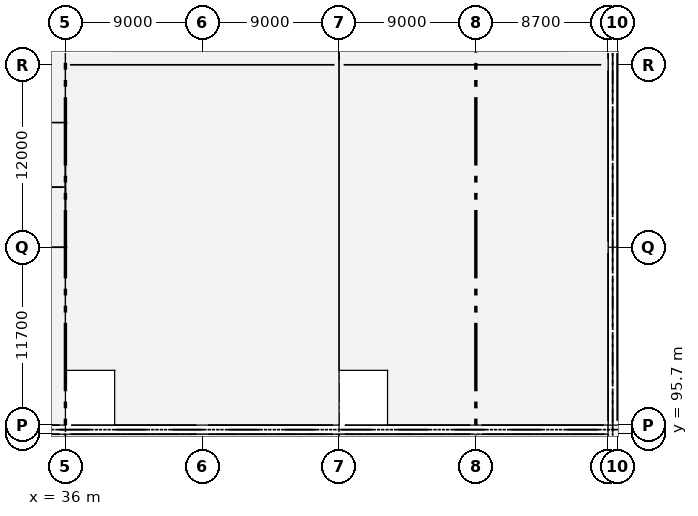
"""IFC4 building model, lengths in metres.
Left out: names, types, materials, properties, quantities, classifications, styles, units other than length and angle.
Written with IfcOpenShell. Run it as: python <this file> out.ifc"""

import sys

from ifc_helpers import new_model, si_unit, direction, frame, frame_2d, origin, origin_2d, place, context, subcontext, project, spatial, rectangle, extrude, element, fill, save


model = new_model("IFC4")
c1 = context("Model", 3, precision=1e-05, world=origin(), true_north=direction((0.0, 1.0)))
c2 = subcontext(c1, "Body", "Model", "MODEL_VIEW")
j1 = project(units=[si_unit("LENGTHUNIT", "METRE"), si_unit("PLANEANGLEUNIT", "RADIAN")], contexts=[c1])
p1 = place(None, origin())
s1 = spatial("IfcSite", under=j1, at=p1, CompositionType="ELEMENT")
p2 = place(p1, origin())
s2 = spatial("IfcBuilding", under=s1, at=p2, CompositionType="ELEMENT")
p3 = place(p2, origin())
s3 = spatial("IfcBuildingStorey", under=s2, at=p3, CompositionType="ELEMENT", Elevation=0.0)
for number, where, z_axis, x_axis in (
    (1, (36.0, 95.7, -0.5), (0.0, 0.0, 1.0), (1.0, 0.0, 0.0)),
    (2, (36.0, 96.3, -0.5), (0.0, 0.0, 1.0), (1.0, 0.0, 0.0)),
):
    element("IfcColumn", number, at=place(p3, frame(where, z_axis=z_axis, x_axis=x_axis)), inside=s3, PredefinedType="COLUMN", context=c2, shape_type="SweptSolid", body=[
        extrude(rectangle(XDim=0.75, YDim=0.55, at=origin_2d()), origin(), (0.0, 0.0, 1.0), 6.8),
    ])
for number, where, z_axis, x_axis in (
    (3, (36.0, 108.0, -0.5), (0.0, 0.0, 1.0), (1.0, 0.0, 0.0)),
    (4, (36.0, 120.0, -0.5), (0.0, 0.0, 1.0), (1.0, 0.0, 0.0)),
):
    element("IfcColumn", number, at=place(p3, frame(where, z_axis=z_axis, x_axis=x_axis)), inside=s3, PredefinedType="COLUMN", context=c2, shape_type="SweptSolid", body=[
        extrude(rectangle(XDim=0.75, YDim=0.75, at=origin_2d()), origin(), (0.0, 0.0, 1.0), 6.8),
    ])
for number, where, z_axis, x_axis in (
    (5, (45.0, 95.7, -0.5), (0.0, 0.0, 1.0), (1.0, 0.0, 0.0)),
    (6, (45.0, 96.3, -0.5), (0.0, 0.0, 1.0), (1.0, 0.0, 0.0)),
):
    element("IfcColumn", number, at=place(p3, frame(where, z_axis=z_axis, x_axis=x_axis)), inside=s3, PredefinedType="COLUMN", context=c2, shape_type="SweptSolid", body=[
        extrude(rectangle(XDim=0.75, YDim=0.55, at=origin_2d()), origin(), (0.0, 0.0, 1.0), 6.8),
    ])
for number, where, z_axis, x_axis in (
    (7, (45.0, 108.0, -0.5), (0.0, 0.0, 1.0), (1.0, 0.0, 0.0)),
    (8, (45.0, 120.0, -0.5), (0.0, 0.0, 1.0), (1.0, 0.0, 0.0)),
):
    element("IfcColumn", number, at=place(p3, frame(where, z_axis=z_axis, x_axis=x_axis)), inside=s3, PredefinedType="COLUMN", context=c2, shape_type="SweptSolid", body=[
        extrude(rectangle(XDim=0.75, YDim=0.75, at=origin_2d()), origin(), (0.0, 0.0, 1.0), 6.8),
    ])
for number, where, z_axis, x_axis in (
    (9, (54.0, 95.7, -0.5), (0.0, 0.0, 1.0), (1.0, 0.0, 0.0)),
    (10, (54.0, 96.3, -0.5), (0.0, 0.0, 1.0), (1.0, 0.0, 0.0)),
):
    element("IfcColumn", number, at=place(p3, frame(where, z_axis=z_axis, x_axis=x_axis)), inside=s3, PredefinedType="COLUMN", context=c2, shape_type="SweptSolid", body=[
        extrude(rectangle(XDim=0.75, YDim=0.55, at=origin_2d()), origin(), (0.0, 0.0, 1.0), 6.8),
    ])
for number, where, z_axis, x_axis in (
    (11, (54.0, 108.0, -0.5), (0.0, 0.0, 1.0), (1.0, 0.0, 0.0)),
    (12, (54.0, 120.0, -0.5), (0.0, 0.0, 1.0), (1.0, 0.0, 0.0)),
):
    element("IfcColumn", number, at=place(p3, frame(where, z_axis=z_axis, x_axis=x_axis)), inside=s3, PredefinedType="COLUMN", context=c2, shape_type="SweptSolid", body=[
        extrude(rectangle(XDim=0.75, YDim=0.75, at=origin_2d()), origin(), (0.0, 0.0, 1.0), 6.8),
    ])
for number, where, z_axis, x_axis in (
    (13, (63.0, 95.7, -0.5), (0.0, 0.0, 1.0), (1.0, 0.0, 0.0)),
    (14, (63.0, 96.3, -0.5), (0.0, 0.0, 1.0), (1.0, 0.0, 0.0)),
):
    element("IfcColumn", number, at=place(p3, frame(where, z_axis=z_axis, x_axis=x_axis)), inside=s3, PredefinedType="COLUMN", context=c2, shape_type="SweptSolid", body=[
        extrude(rectangle(XDim=0.75, YDim=0.55, at=origin_2d()), origin(), (0.0, 0.0, 1.0), 6.8),
    ])
for number, where, z_axis, x_axis in (
    (15, (63.0, 108.0, -0.5), (0.0, 0.0, 1.0), (1.0, 0.0, 0.0)),
    (16, (63.0, 120.0, -0.5), (0.0, 0.0, 1.0), (1.0, 0.0, 0.0)),
):
    element("IfcColumn", number, at=place(p3, frame(where, z_axis=z_axis, x_axis=x_axis)), inside=s3, PredefinedType="COLUMN", context=c2, shape_type="SweptSolid", body=[
        extrude(rectangle(XDim=0.75, YDim=0.75, at=origin_2d()), origin(), (0.0, 0.0, 1.0), 6.8),
    ])
for number, where, z_axis, x_axis in (
    (17, (71.7, 95.7, -0.5), (0.0, 0.0, 1.0), (1.0, 0.0, 0.0)),
    (18, (71.7, 96.3, -0.5), (0.0, 0.0, 1.0), (1.0, 0.0, 0.0)),
):
    element("IfcColumn", number, at=place(p3, frame(where, z_axis=z_axis, x_axis=x_axis)), inside=s3, PredefinedType="COLUMN", context=c2, shape_type="SweptSolid", body=[
        extrude(rectangle(XDim=0.55, YDim=0.55, at=origin_2d()), origin(), (0.0, 0.0, 1.0), 6.8),
    ])
for number, where, z_axis, x_axis in (
    (19, (71.7, 108.0, -0.5), (0.0, 0.0, 1.0), (1.0, 0.0, 0.0)),
    (20, (71.7, 120.0, -0.5), (0.0, 0.0, 1.0), (1.0, 0.0, 0.0)),
):
    element("IfcColumn", number, at=place(p3, frame(where, z_axis=z_axis, x_axis=x_axis)), inside=s3, PredefinedType="COLUMN", context=c2, shape_type="SweptSolid", body=[
        extrude(rectangle(XDim=0.55, YDim=0.75, at=origin_2d()), origin(), (0.0, 0.0, 1.0), 6.8),
    ])
p4 = place(p3, frame((72.3, 96.3, -0.5), z_axis=(0.0, 0.0, 1.0), x_axis=(1.0, 0.0, 0.0)))
e21 = element("IfcColumn", 21, at=p4, inside=s3, PredefinedType="COLUMN", context=c2, shape_type="SweptSolid", body=[
    extrude(rectangle(XDim=0.55, YDim=0.55, at=origin_2d()), origin(), (0.0, 0.0, 1.0), 6.8),
])
for number, where, z_axis, x_axis in (
    (22, (27.375, 95.7, 0.0), (0.0, 0.0, 1.0), (1.0, 0.0, 0.0)),
    (23, (36.375, 95.7, 0.0), (0.0, 0.0, 1.0), (1.0, 0.0, 0.0)),
    (24, (45.375, 95.7, 0.0), (0.0, 0.0, 1.0), (1.0, 0.0, 0.0)),
    (25, (54.375, 95.7, 0.0), (0.0, 0.0, 1.0), (1.0, 0.0, 0.0)),
):
    element("IfcWall", number, at=place(p3, frame(where, z_axis=z_axis, x_axis=x_axis)), inside=s3, PredefinedType="SOLIDWALL", context=c2, shape_type="SweptSolid", body=[
        extrude(rectangle(XDim=8.25, YDim=0.38, at=frame_2d((4.125, 0.0))), origin(), (0.0, 0.0, 1.0), 5.08),
    ])
p5 = place(p3, frame((63.375, 95.7, 0.0), z_axis=(0.0, 0.0, 1.0), x_axis=(1.0, 0.0, 0.0)))
e26 = element("IfcWall", 26, at=p5, inside=s3, PredefinedType="SOLIDWALL", context=c2, shape_type="SweptSolid", body=[
    extrude(rectangle(XDim=8.05, YDim=0.38, at=frame_2d((4.025, 0.0))), origin(), (0.0, 0.0, 1.0), 5.08),
])
p6 = place(p3, frame((27.375, 96.3, 0.0), z_axis=(0.0, 0.0, 1.0), x_axis=(1.0, 0.0, 0.0)))
e27 = element("IfcWall", 27, at=p6, inside=s3, PredefinedType="SOLIDWALL", context=c2, shape_type="SweptSolid", body=[
    extrude(rectangle(XDim=8.25, YDim=0.38, at=frame_2d((4.125, 0.0))), origin(), (0.0, 0.0, 1.0), 5.08),
])
p7 = place(p3, frame((36.375, 96.3, 0.0), z_axis=(0.0, 0.0, 1.0), x_axis=(1.0, 0.0, 0.0)))
e28 = element("IfcWall", 28, at=p7, inside=s3, PredefinedType="SOLIDWALL", context=c2, shape_type="SweptSolid", body=[
    extrude(rectangle(XDim=8.25, YDim=0.38, at=frame_2d((4.125, 0.0))), origin(), (0.0, 0.0, 1.0), 5.08),
])
p8 = place(p7, frame((3.325, 0.0, 3.34)))
e29 = element("IfcOpeningElement", 29, at=p8, cuts=e28, PredefinedType="OPENING", context=c2, shape_type="SweptSolid", body=[
    extrude(rectangle(XDim=1.6, YDim=1.45, at=frame_2d((0.8, 0.725))), frame((0.0, 0.2, 0.0), z_axis=(0.0, -1.0, 0.0), x_axis=(1.0, 0.0, 0.0)), (0.0, 0.0, 1.0), 0.4),
])
p9 = place(p3, frame((45.375, 96.3, 0.0), z_axis=(0.0, 0.0, 1.0), x_axis=(1.0, 0.0, 0.0)))
e30 = element("IfcWall", 30, at=p9, inside=s3, PredefinedType="SOLIDWALL", context=c2, shape_type="SweptSolid", body=[
    extrude(rectangle(XDim=8.25, YDim=0.38, at=frame_2d((4.125, 0.0))), origin(), (0.0, 0.0, 1.0), 5.08),
])
p10 = place(p3, frame((54.375, 96.3, 0.0), z_axis=(0.0, 0.0, 1.0), x_axis=(1.0, 0.0, 0.0)))
e31 = element("IfcWall", 31, at=p10, inside=s3, PredefinedType="SOLIDWALL", context=c2, shape_type="SweptSolid", body=[
    extrude(rectangle(XDim=8.25, YDim=0.38, at=frame_2d((4.125, 0.0))), origin(), (0.0, 0.0, 1.0), 5.08),
])
p11 = place(p10, frame((3.325, 0.0, 3.59)))
e32 = element("IfcOpeningElement", 32, at=p11, cuts=e31, PredefinedType="OPENING", context=c2, shape_type="SweptSolid", body=[
    extrude(rectangle(XDim=1.6, YDim=1.45, at=frame_2d((0.8, 0.725))), frame((0.0, 0.2, 0.0), z_axis=(0.0, -1.0, 0.0), x_axis=(1.0, 0.0, 0.0)), (0.0, 0.0, 1.0), 0.4),
])
p12 = place(p3, frame((63.375, 96.3, 0.0), z_axis=(0.0, 0.0, 1.0), x_axis=(1.0, 0.0, 0.0)))
e33 = element("IfcWall", 33, at=p12, inside=s3, PredefinedType="SOLIDWALL", context=c2, shape_type="SweptSolid", body=[
    extrude(rectangle(XDim=8.05, YDim=0.38, at=frame_2d((4.025, 0.0))), origin(), (0.0, 0.0, 1.0), 5.08),
])
p13 = place(p3, frame((71.7, 96.575, 0.0), z_axis=(0.0, 0.0, 1.0), x_axis=(0.0, 1.0, 0.0)))
e34 = element("IfcWall", 34, at=p13, inside=s3, PredefinedType="SOLIDWALL", context=c2, shape_type="SweptSolid", body=[
    extrude(rectangle(XDim=11.05, YDim=0.38, at=frame_2d((5.525, 0.0))), origin(), (0.0, 0.0, 1.0), 4.83),
])
p14 = place(p13, frame((4.725, 0.0, 3.34)))
e35 = element("IfcOpeningElement", 35, at=p14, cuts=e34, PredefinedType="OPENING", context=c2, shape_type="SweptSolid", body=[
    extrude(rectangle(XDim=1.6, YDim=1.45, at=frame_2d((0.8, 0.725))), frame((0.0, 0.2, 0.0), z_axis=(0.0, -1.0, 0.0), x_axis=(1.0, 0.0, 0.0)), (0.0, 0.0, 1.0), 0.4),
])
p15 = place(p3, frame((71.7, 108.375, 0.0), z_axis=(0.0, 0.0, 1.0), x_axis=(0.0, 1.0, 0.0)))
e36 = element("IfcWall", 36, at=p15, inside=s3, PredefinedType="SOLIDWALL", context=c2, shape_type="SweptSolid", body=[
    extrude(rectangle(XDim=11.25, YDim=0.38, at=frame_2d((5.625, 0.0))), origin(), (0.0, 0.0, 1.0), 4.83),
])
p16 = place(p3, frame((71.7, 120.375, 0.0), z_axis=(0.0, 0.0, 1.0), x_axis=(0.0, 1.0, 0.0)))
e37 = element("IfcWall", 37, at=p16, inside=s3, PredefinedType="SOLIDWALL", context=c2, shape_type="SweptSolid", body=[
    extrude(rectangle(XDim=11.25, YDim=0.38, at=frame_2d((5.625, 0.0))), origin(), (0.0, 0.0, 1.0), 4.83),
])
p17 = place(p16, frame((4.825, 0.0, 3.34)))
e38 = element("IfcOpeningElement", 38, at=p17, cuts=e37, PredefinedType="OPENING", context=c2, shape_type="SweptSolid", body=[
    extrude(rectangle(XDim=1.6, YDim=1.45, at=frame_2d((0.8, 0.725))), frame((0.0, 0.2, 0.0), z_axis=(0.0, -1.0, 0.0), x_axis=(1.0, 0.0, 0.0)), (0.0, 0.0, 1.0), 0.4),
])
p18 = place(p3, frame((72.3, 96.575, 0.0), z_axis=(0.0, 0.0, 1.0), x_axis=(0.0, 1.0, 0.0)))
e39 = element("IfcWall", 39, at=p18, inside=s3, PredefinedType="SOLIDWALL", context=c2, shape_type="SweptSolid", body=[
    extrude(rectangle(XDim=11.425, YDim=0.34, at=frame_2d((5.712, 0.0))), origin(), (0.0, 0.0, 1.0), 6.3),
])
p19 = place(p18, frame((2.608, 0.0, 0.9)))
e40 = element("IfcOpeningElement", 40, at=p19, cuts=e39, PredefinedType="OPENING", context=c2, shape_type="SweptSolid", body=[
    extrude(rectangle(XDim=2.4, YDim=3.5, at=frame_2d((1.2, 1.75))), frame((0.0, 0.18, 0.0), z_axis=(0.0, -1.0, 0.0), x_axis=(1.0, 0.0, 0.0)), (0.0, 0.0, 1.0), 0.36),
])
p20 = place(p18, frame((6.417, 0.0, 0.9)))
e41 = element("IfcOpeningElement", 41, at=p20, cuts=e39, PredefinedType="OPENING", context=c2, shape_type="SweptSolid", body=[
    extrude(rectangle(XDim=2.4, YDim=3.5, at=frame_2d((1.2, 1.75))), frame((0.0, 0.18, 0.0), z_axis=(0.0, -1.0, 0.0), x_axis=(1.0, 0.0, 0.0)), (0.0, 0.0, 1.0), 0.36),
])
p21 = place(p3, frame((72.3, 108.0, 0.0), z_axis=(0.0, 0.0, 1.0), x_axis=(0.0, 1.0, 0.0)))
e42 = element("IfcWall", 42, at=p21, inside=s3, PredefinedType="SOLIDWALL", context=c2, shape_type="SweptSolid", body=[
    extrude(rectangle(XDim=12.0, YDim=0.34, at=frame_2d((6.0, 0.0))), origin(), (0.0, 0.0, 1.0), 6.3),
])
p22 = place(p21, frame((2.8, 0.0, 0.9)))
e43 = element("IfcOpeningElement", 43, at=p22, cuts=e42, PredefinedType="OPENING", context=c2, shape_type="SweptSolid", body=[
    extrude(rectangle(XDim=2.4, YDim=3.5, at=frame_2d((1.2, 1.75))), frame((0.0, 0.18, 0.0), z_axis=(0.0, -1.0, 0.0), x_axis=(1.0, 0.0, 0.0)), (0.0, 0.0, 1.0), 0.36),
])
p23 = place(p21, frame((6.8, 0.0, 0.9)))
e44 = element("IfcOpeningElement", 44, at=p23, cuts=e42, PredefinedType="OPENING", context=c2, shape_type="SweptSolid", body=[
    extrude(rectangle(XDim=2.4, YDim=3.5, at=frame_2d((1.2, 1.75))), frame((0.0, 0.18, 0.0), z_axis=(0.0, -1.0, 0.0), x_axis=(1.0, 0.0, 0.0)), (0.0, 0.0, 1.0), 0.36),
])
p24 = place(p3, frame((72.3, 120.0, 0.0), z_axis=(0.0, 0.0, 1.0), x_axis=(0.0, 1.0, 0.0)))
e45 = element("IfcWall", 45, at=p24, inside=s3, PredefinedType="SOLIDWALL", context=c2, shape_type="SweptSolid", body=[
    extrude(rectangle(XDim=11.625, YDim=0.34, at=frame_2d((5.812, 0.0))), origin(), (0.0, 0.0, 1.0), 6.3),
])
p25 = place(p24, frame((2.675, 0.0, 0.9)))
e46 = element("IfcOpeningElement", 46, at=p25, cuts=e45, PredefinedType="OPENING", context=c2, shape_type="SweptSolid", body=[
    extrude(rectangle(XDim=2.4, YDim=3.5, at=frame_2d((1.2, 1.75))), frame((0.0, 0.18, 0.0), z_axis=(0.0, -1.0, 0.0), x_axis=(1.0, 0.0, 0.0)), (0.0, 0.0, 1.0), 0.36),
])
p26 = place(p24, frame((6.55, 0.0, 0.9)))
e47 = element("IfcOpeningElement", 47, at=p26, cuts=e45, PredefinedType="OPENING", context=c2, shape_type="SweptSolid", body=[
    extrude(rectangle(XDim=2.4, YDim=3.5, at=frame_2d((1.2, 1.75))), frame((0.0, 0.18, 0.0), z_axis=(0.0, -1.0, 0.0), x_axis=(1.0, 0.0, 0.0)), (0.0, 0.0, 1.0), 0.36),
])
for number, where, z_axis, x_axis in (
    (48, (26.875, 108.0, -0.5), (0.0, 0.0, 1.0), (1.0, 0.0, 0.0)),
    (49, (26.875, 116.2, -0.5), (0.0, 0.0, 1.0), (1.0, 0.0, 0.0)),
):
    element("IfcWall", number, at=place(p3, frame(where, z_axis=z_axis, x_axis=x_axis)), inside=s3, PredefinedType="SOLIDWALL", context=c2, shape_type="SweptSolid", body=[
        extrude(rectangle(XDim=9.25, YDim=0.25, at=frame_2d((4.625, 0.0))), origin(), (0.0, 0.0, 1.0), 6.8),
    ])
p27 = place(p3, frame((36.0, 108.125, -0.5), z_axis=(0.0, 0.0, 1.0), x_axis=(0.0, 1.0, 0.0)))
e50 = element("IfcWall", 50, at=p27, inside=s3, PredefinedType="SOLIDWALL", context=c2, shape_type="SweptSolid", body=[
    extrude(rectangle(XDim=7.95, YDim=0.25, at=frame_2d((3.975, 0.0))), origin(), (0.0, 0.0, 1.0), 6.8),
])
p28 = place(p27, frame((4.9, 0.0, 0.5)))
e51 = element("IfcOpeningElement", 51, at=p28, cuts=e50, PredefinedType="OPENING", context=c2, shape_type="SweptSolid", body=[
    extrude(rectangle(XDim=1.6, YDim=2.2, at=frame_2d((0.8, 1.1))), frame((0.0, 0.135, 0.0), z_axis=(0.0, -1.0, 0.0), x_axis=(1.0, 0.0, 0.0)), (0.0, 0.0, 1.0), 0.27),
])
p29 = place(p3, frame((27.125, 111.95, -0.5), z_axis=(0.0, 0.0, 1.0), x_axis=(1.0, 0.0, 0.0)))
e52 = element("IfcWall", 52, at=p29, inside=s3, PredefinedType="SOLIDWALL", context=c2, shape_type="SweptSolid", body=[
    extrude(rectangle(XDim=8.75, YDim=0.25, at=frame_2d((4.375, 0.0))), origin(), (0.0, 0.0, 1.0), 6.8),
])
p30 = place(p3, frame((36.3, 120.0, 0.0), z_axis=(0.0, 0.0, 1.0), x_axis=(1.0, 0.0, 0.0)))
e53 = element("IfcWall", 53, at=p30, inside=s3, PredefinedType="STANDARD", context=c2, shape_type="SweptSolid", body=[
    extrude(rectangle(XDim=17.4, YDim=0.21, at=frame_2d((8.7, 0.0))), origin(), (0.0, 0.0, 1.0), 5.13),
])
p31 = place(p30, frame((3.35, 0.0, 0.0)))
e54 = element("IfcOpeningElement", 54, at=p31, cuts=e53, PredefinedType="OPENING", context=c2, shape_type="SweptSolid", body=[
    extrude(rectangle(XDim=2.0, YDim=2.5, at=frame_2d((1.0, 1.25))), frame((0.0, 0.115, 0.0), z_axis=(0.0, -1.0, 0.0), x_axis=(1.0, 0.0, 0.0)), (0.0, 0.0, 1.0), 0.23),
])
p32 = place(p3, frame((54.3, 120.0, 0.0), z_axis=(0.0, 0.0, 1.0), x_axis=(1.0, 0.0, 0.0)))
e55 = element("IfcWall", 55, at=p32, inside=s3, PredefinedType="STANDARD", context=c2, shape_type="SweptSolid", body=[
    extrude(rectangle(XDim=16.95, YDim=0.195, at=frame_2d((8.475, 0.0))), origin(), (0.0, 0.0, 1.0), 5.13),
])
p33 = place(p32, frame((3.5, 0.0, 0.0)))
e56 = element("IfcOpeningElement", 56, at=p33, cuts=e55, PredefinedType="OPENING", context=c2, shape_type="SweptSolid", body=[
    extrude(rectangle(XDim=1.7, YDim=2.4, at=frame_2d((0.85, 1.2))), frame((0.0, 0.107, 0.0), z_axis=(0.0, -1.0, 0.0), x_axis=(1.0, 0.0, 0.0)), (0.0, 0.0, 1.0), 0.215),
])
p34 = place(p3, frame((54.0, 120.3, 0.0), z_axis=(0.0, 0.0, 1.0), x_axis=(0.0, 1.0, 0.0)))
e57 = element("IfcWall", 57, at=p34, inside=s3, PredefinedType="STANDARD", context=c2, shape_type="SweptSolid", body=[
    extrude(rectangle(XDim=23.25, YDim=0.21, at=frame_2d((11.625, 0.0))), origin(), (0.0, 0.0, 1.0), 4.83),
])
p35 = place(p34, frame((4.92, 0.0, 0.0)))
e58 = element("IfcOpeningElement", 58, at=p35, cuts=e57, PredefinedType="OPENING", context=c2, shape_type="SweptSolid", body=[
    extrude(rectangle(XDim=1.86, YDim=2.45, at=frame_2d((0.93, 1.225))), frame((0.0, 0.115, 0.0), z_axis=(0.0, -1.0, 0.0), x_axis=(1.0, 0.0, 0.0)), (0.0, 0.0, 1.0), 0.23),
])
p36 = place(p8, origin())
e59 = element("IfcWindow", 59, at=p36, inside=s3, PartitioningType="DOUBLE_PANEL_HORIZONTAL", PredefinedType="WINDOW", context=c2, shape_type="SweptSolid", body=[
    extrude(rectangle(XDim=1.6, YDim=1.45, at=frame_2d((0.8, 0.725))), frame((0.0, 0.03, 0.0), z_axis=(0.0, -1.0, 0.0), x_axis=(1.0, 0.0, 0.0)), (0.0, 0.0, 1.0), 0.06),
])
fill(e29, e59)
p37 = place(p11, origin())
e60 = element("IfcWindow", 60, at=p37, inside=s3, PartitioningType="DOUBLE_PANEL_HORIZONTAL", PredefinedType="WINDOW", context=c2, shape_type="SweptSolid", body=[
    extrude(rectangle(XDim=1.6, YDim=1.45, at=frame_2d((0.8, 0.725))), frame((0.0, 0.03, 0.0), z_axis=(0.0, -1.0, 0.0), x_axis=(1.0, 0.0, 0.0)), (0.0, 0.0, 1.0), 0.06),
])
fill(e32, e60)
p38 = place(p14, origin())
e61 = element("IfcWindow", 61, at=p38, inside=s3, PartitioningType="DOUBLE_PANEL_HORIZONTAL", PredefinedType="WINDOW", context=c2, shape_type="SweptSolid", body=[
    extrude(rectangle(XDim=1.6, YDim=1.45, at=frame_2d((0.8, 0.725))), frame((0.0, 0.03, 0.0), z_axis=(0.0, -1.0, 0.0), x_axis=(1.0, 0.0, 0.0)), (0.0, 0.0, 1.0), 0.06),
])
fill(e35, e61)
p39 = place(p19, origin())
e62 = element("IfcWindow", 62, at=p39, inside=s3, PartitioningType="TRIPLE_PANEL_VERTICAL", PredefinedType="WINDOW", context=c2, shape_type="SweptSolid", body=[
    extrude(rectangle(XDim=2.4, YDim=3.5, at=frame_2d((1.2, 1.75))), frame((0.0, 0.03, 0.0), z_axis=(0.0, -1.0, 0.0), x_axis=(1.0, 0.0, 0.0)), (0.0, 0.0, 1.0), 0.06),
])
fill(e40, e62)
p40 = place(p20, origin())
e63 = element("IfcWindow", 63, at=p40, inside=s3, PartitioningType="TRIPLE_PANEL_VERTICAL", PredefinedType="WINDOW", context=c2, shape_type="SweptSolid", body=[
    extrude(rectangle(XDim=2.4, YDim=3.5, at=frame_2d((1.2, 1.75))), frame((0.0, 0.03, 0.0), z_axis=(0.0, -1.0, 0.0), x_axis=(1.0, 0.0, 0.0)), (0.0, 0.0, 1.0), 0.06),
])
fill(e41, e63)
p41 = place(p22, origin())
e64 = element("IfcWindow", 64, at=p41, inside=s3, PartitioningType="TRIPLE_PANEL_VERTICAL", PredefinedType="WINDOW", context=c2, shape_type="SweptSolid", body=[
    extrude(rectangle(XDim=2.4, YDim=3.5, at=frame_2d((1.2, 1.75))), frame((0.0, 0.03, 0.0), z_axis=(0.0, -1.0, 0.0), x_axis=(1.0, 0.0, 0.0)), (0.0, 0.0, 1.0), 0.06),
])
fill(e43, e64)
p42 = place(p23, origin())
e65 = element("IfcWindow", 65, at=p42, inside=s3, PartitioningType="TRIPLE_PANEL_VERTICAL", PredefinedType="WINDOW", context=c2, shape_type="SweptSolid", body=[
    extrude(rectangle(XDim=2.4, YDim=3.5, at=frame_2d((1.2, 1.75))), frame((0.0, 0.03, 0.0), z_axis=(0.0, -1.0, 0.0), x_axis=(1.0, 0.0, 0.0)), (0.0, 0.0, 1.0), 0.06),
])
fill(e44, e65)
p43 = place(p28, origin())
e66 = element("IfcDoor", 66, at=p43, inside=s3, OperationType="SINGLE_SWING_RIGHT", PredefinedType="DOOR", context=c2, shape_type="SweptSolid", body=[
    extrude(rectangle(XDim=1.6, YDim=2.2, at=frame_2d((0.8, 1.1))), frame((0.0, 0.025, 0.0), z_axis=(0.0, -1.0, 0.0), x_axis=(1.0, 0.0, 0.0)), (0.0, 0.0, 1.0), 0.05),
])
fill(e51, e66)
p44 = place(p31, origin())
e67 = element("IfcDoor", 67, at=p44, inside=s3, OperationType="SLIDING_TO_LEFT", PredefinedType="DOOR", context=c2, shape_type="SweptSolid", body=[
    extrude(rectangle(XDim=2.0, YDim=2.5, at=frame_2d((1.0, 1.25))), frame((0.0, 0.025, 0.0), z_axis=(0.0, -1.0, 0.0), x_axis=(1.0, 0.0, 0.0)), (0.0, 0.0, 1.0), 0.05),
])
fill(e54, e67)
p45 = place(p33, origin())
e68 = element("IfcDoor", 68, at=p45, inside=s3, OperationType="SLIDING_TO_LEFT", PredefinedType="DOOR", context=c2, shape_type="SweptSolid", body=[
    extrude(rectangle(XDim=1.7, YDim=2.4, at=frame_2d((0.85, 1.2))), frame((0.0, 0.025, 0.0), z_axis=(0.0, -1.0, 0.0), x_axis=(1.0, 0.0, 0.0)), (0.0, 0.0, 1.0), 0.05),
])
fill(e56, e68)
save(model, sys.argv[1])
